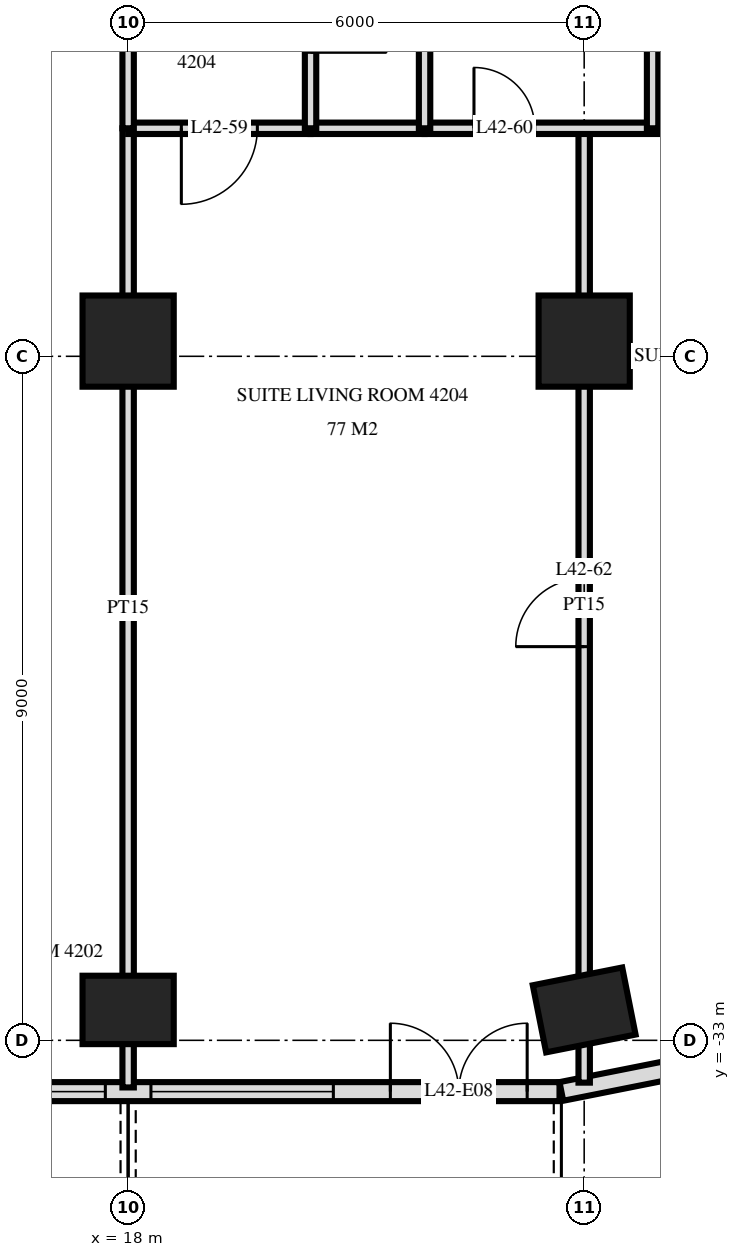
"""IFC4 building model, lengths in metres.
Left out: names, types, materials, properties, quantities, classifications, styles, units other than length and angle.
Written with IfcOpenShell. Run it as: python <this file> out.ifc"""

import sys

from ifc_helpers import new_model, si_unit, direction, frame, frame_2d, origin, origin_2d, place, context, subcontext, project, spatial, rectangle, extrude, element, fill, save


model = new_model("IFC4")
c1 = context("Model", 3, precision=1e-05, world=origin(), true_north=direction((0.0, 1.0)))
c2 = subcontext(c1, "Body", "Model", "MODEL_VIEW")
j1 = project(units=[si_unit("LENGTHUNIT", "METRE"), si_unit("PLANEANGLEUNIT", "RADIAN")], contexts=[c1])
p1 = place(None, origin())
s1 = spatial("IfcSite", under=j1, at=p1, CompositionType="ELEMENT")
p2 = place(p1, origin())
s2 = spatial("IfcBuilding", under=s1, at=p2, CompositionType="ELEMENT")
p3 = place(p2, frame((0.0, 0.0, 163.2)))
s3 = spatial("IfcBuildingStorey", under=s2, at=p3, CompositionType="ELEMENT", Elevation=163.2)
p4 = place(p3, frame((18.0, -32.6, 0.0), z_axis=(0.0, 0.0, 1.0), x_axis=(1.0, 0.0, 0.0)))
e1 = element("IfcColumn", 1, at=p4, inside=s3, PredefinedType="COLUMN", context=c2, shape_type="SweptSolid", body=[
    extrude(rectangle(XDim=1.2, YDim=0.9, at=origin_2d()), origin(), (0.0, 0.0, 1.0), 3.6),
])
p5 = place(p3, frame((18.0, -23.8, 0.0), z_axis=(0.0, 0.0, 1.0), x_axis=(1.0, 0.0, 0.0)))
e2 = element("IfcColumn", 2, at=p5, inside=s3, PredefinedType="COLUMN", context=c2, shape_type="SweptSolid", body=[
    extrude(rectangle(XDim=1.2, YDim=1.2, at=origin_2d()), origin(), (0.0, 0.0, 1.0), 3.6),
])
p6 = place(p3, frame((24.0, -32.6, 0.0), z_axis=(0.0, 0.0, 1.0), x_axis=(0.980792089743, 0.195056086032, 0.0)))
e3 = element("IfcColumn", 3, at=p6, inside=s3, PredefinedType="COLUMN", context=c2, shape_type="SweptSolid", body=[
    extrude(rectangle(XDim=1.2, YDim=0.9, at=origin_2d()), origin(), (0.0, 0.0, 1.0), 3.6),
])
p7 = place(p3, frame((24.0, -23.8, 0.0), z_axis=(0.0, 0.0, 1.0), x_axis=(1.0, 0.0, 0.0)))
e4 = element("IfcColumn", 4, at=p7, inside=s3, PredefinedType="COLUMN", context=c2, shape_type="SweptSolid", body=[
    extrude(rectangle(XDim=1.2, YDim=1.2, at=origin_2d()), origin(), (0.0, 0.0, 1.0), 3.6),
])
p8 = place(p3, frame((-23.675, -33.675, 0.0), z_axis=(0.0, 0.0, 1.0), x_axis=(1.0, 0.0, 0.0)))
e5 = element("IfcWall", 5, at=p8, inside=s3, PredefinedType="SOLIDWALL", context=c2, shape_type="SweptSolid", body=[
    extrude(rectangle(XDim=47.351, YDim=0.25, at=frame_2d((23.675, 0.0))), origin(), (0.0, 0.0, 1.0), 3.32),
])
p9 = place(p8, frame((0.575, 0.0, 0.0)))
e6 = element("IfcOpeningElement", 6, at=p9, cuts=e5, PredefinedType="OPENING", context=c2, shape_type="SweptSolid", body=[
    extrude(rectangle(XDim=1.8, YDim=2.4, at=frame_2d((0.9, 1.2))), frame((0.0, 0.135, 0.0), z_axis=(0.0, -1.0, 0.0), x_axis=(1.0, 0.0, 0.0)), (0.0, 0.0, 1.0), 0.27),
])
p10 = place(p8, frame((3.425, 0.0, 0.3)))
e7 = element("IfcOpeningElement", 7, at=p10, cuts=e5, PredefinedType="OPENING", context=c2, shape_type="SweptSolid", body=[
    extrude(rectangle(XDim=1.8, YDim=2.1, at=frame_2d((0.9, 1.05))), frame((0.0, 0.135, 0.0), z_axis=(0.0, -1.0, 0.0), x_axis=(1.0, 0.0, 0.0)), (0.0, 0.0, 1.0), 0.27),
])
p11 = place(p8, frame((5.975, 0.0, 0.3)))
e8 = element("IfcOpeningElement", 8, at=p11, cuts=e5, PredefinedType="OPENING", context=c2, shape_type="SweptSolid", body=[
    extrude(rectangle(XDim=2.4, YDim=2.1, at=frame_2d((1.2, 1.05))), frame((0.0, 0.135, 0.0), z_axis=(0.0, -1.0, 0.0), x_axis=(1.0, 0.0, 0.0)), (0.0, 0.0, 1.0), 0.27),
])
p12 = place(p8, frame((9.275, 0.0, 0.0)))
e9 = element("IfcOpeningElement", 9, at=p12, cuts=e5, PredefinedType="OPENING", context=c2, shape_type="SweptSolid", body=[
    extrude(rectangle(XDim=1.8, YDim=2.4, at=frame_2d((0.9, 1.2))), frame((0.0, 0.135, 0.0), z_axis=(0.0, -1.0, 0.0), x_axis=(1.0, 0.0, 0.0)), (0.0, 0.0, 1.0), 0.27),
])
p13 = place(p8, frame((12.275, 0.0, 0.0)))
e10 = element("IfcOpeningElement", 10, at=p13, cuts=e5, PredefinedType="OPENING", context=c2, shape_type="SweptSolid", body=[
    extrude(rectangle(XDim=1.8, YDim=2.4, at=frame_2d((0.9, 1.2))), frame((0.0, 0.135, 0.0), z_axis=(0.0, -1.0, 0.0), x_axis=(1.0, 0.0, 0.0)), (0.0, 0.0, 1.0), 0.27),
])
p14 = place(p8, frame((14.975, 0.0, 0.3)))
e11 = element("IfcOpeningElement", 11, at=p14, cuts=e5, PredefinedType="OPENING", context=c2, shape_type="SweptSolid", body=[
    extrude(rectangle(XDim=2.4, YDim=2.1, at=frame_2d((1.2, 1.05))), frame((0.0, 0.135, 0.0), z_axis=(0.0, -1.0, 0.0), x_axis=(1.0, 0.0, 0.0)), (0.0, 0.0, 1.0), 0.27),
])
p15 = place(p8, frame((17.975, 0.0, 0.3)))
e12 = element("IfcOpeningElement", 12, at=p15, cuts=e5, PredefinedType="OPENING", context=c2, shape_type="SweptSolid", body=[
    extrude(rectangle(XDim=2.4, YDim=2.1, at=frame_2d((1.2, 1.05))), frame((0.0, 0.135, 0.0), z_axis=(0.0, -1.0, 0.0), x_axis=(1.0, 0.0, 0.0)), (0.0, 0.0, 1.0), 0.27),
])
p16 = place(p8, frame((21.275, 0.0, 0.0)))
e13 = element("IfcOpeningElement", 13, at=p16, cuts=e5, PredefinedType="OPENING", context=c2, shape_type="SweptSolid", body=[
    extrude(rectangle(XDim=1.8, YDim=2.4, at=frame_2d((0.9, 1.2))), frame((0.0, 0.135, 0.0), z_axis=(0.0, -1.0, 0.0), x_axis=(1.0, 0.0, 0.0)), (0.0, 0.0, 1.0), 0.27),
])
p17 = place(p8, frame((24.275, 0.0, 0.0)))
e14 = element("IfcOpeningElement", 14, at=p17, cuts=e5, PredefinedType="OPENING", context=c2, shape_type="SweptSolid", body=[
    extrude(rectangle(XDim=1.8, YDim=2.4, at=frame_2d((0.9, 1.2))), frame((0.0, 0.135, 0.0), z_axis=(0.0, -1.0, 0.0), x_axis=(1.0, 0.0, 0.0)), (0.0, 0.0, 1.0), 0.27),
])
p18 = place(p8, frame((26.975, 0.0, 0.3)))
e15 = element("IfcOpeningElement", 15, at=p18, cuts=e5, PredefinedType="OPENING", context=c2, shape_type="SweptSolid", body=[
    extrude(rectangle(XDim=2.4, YDim=2.1, at=frame_2d((1.2, 1.05))), frame((0.0, 0.135, 0.0), z_axis=(0.0, -1.0, 0.0), x_axis=(1.0, 0.0, 0.0)), (0.0, 0.0, 1.0), 0.27),
])
p19 = place(p8, frame((30.275, 0.0, 0.0)))
e16 = element("IfcOpeningElement", 16, at=p19, cuts=e5, PredefinedType="OPENING", context=c2, shape_type="SweptSolid", body=[
    extrude(rectangle(XDim=1.8, YDim=2.4, at=frame_2d((0.9, 1.2))), frame((0.0, 0.135, 0.0), z_axis=(0.0, -1.0, 0.0), x_axis=(1.0, 0.0, 0.0)), (0.0, 0.0, 1.0), 0.27),
])
p20 = place(p8, frame((32.975, 0.0, 0.3)))
e17 = element("IfcOpeningElement", 17, at=p20, cuts=e5, PredefinedType="OPENING", context=c2, shape_type="SweptSolid", body=[
    extrude(rectangle(XDim=2.4, YDim=2.1, at=frame_2d((1.2, 1.05))), frame((0.0, 0.135, 0.0), z_axis=(0.0, -1.0, 0.0), x_axis=(1.0, 0.0, 0.0)), (0.0, 0.0, 1.0), 0.27),
])
p21 = place(p8, frame((36.275, 0.0, 0.0)))
e18 = element("IfcOpeningElement", 18, at=p21, cuts=e5, PredefinedType="OPENING", context=c2, shape_type="SweptSolid", body=[
    extrude(rectangle(XDim=1.8, YDim=2.4, at=frame_2d((0.9, 1.2))), frame((0.0, 0.135, 0.0), z_axis=(0.0, -1.0, 0.0), x_axis=(1.0, 0.0, 0.0)), (0.0, 0.0, 1.0), 0.27),
])
p22 = place(p8, frame((38.975, 0.0, 0.3)))
e19 = element("IfcOpeningElement", 19, at=p22, cuts=e5, PredefinedType="OPENING", context=c2, shape_type="SweptSolid", body=[
    extrude(rectangle(XDim=2.4, YDim=2.1, at=frame_2d((1.2, 1.05))), frame((0.0, 0.135, 0.0), z_axis=(0.0, -1.0, 0.0), x_axis=(1.0, 0.0, 0.0)), (0.0, 0.0, 1.0), 0.27),
])
p23 = place(p8, frame((41.975, 0.0, 0.3)))
e20 = element("IfcOpeningElement", 20, at=p23, cuts=e5, PredefinedType="OPENING", context=c2, shape_type="SweptSolid", body=[
    extrude(rectangle(XDim=2.4, YDim=2.1, at=frame_2d((1.2, 1.05))), frame((0.0, 0.135, 0.0), z_axis=(0.0, -1.0, 0.0), x_axis=(1.0, 0.0, 0.0)), (0.0, 0.0, 1.0), 0.27),
])
p24 = place(p8, frame((45.125, 0.0, 0.0)))
e21 = element("IfcOpeningElement", 21, at=p24, cuts=e5, PredefinedType="OPENING", context=c2, shape_type="SweptSolid", body=[
    extrude(rectangle(XDim=1.8, YDim=2.4, at=frame_2d((0.9, 1.2))), frame((0.0, 0.135, 0.0), z_axis=(0.0, -1.0, 0.0), x_axis=(1.0, 0.0, 0.0)), (0.0, 0.0, 1.0), 0.27),
])
p25 = place(p3, frame((23.7, -33.673, 0.0), z_axis=(0.0, 0.0, 1.0), x_axis=(0.980775640221, 0.19513878023, 0.0)))
e22 = element("IfcWall", 22, at=p25, inside=s3, PredefinedType="SOLIDWALL", context=c2, shape_type="SweptSolid", body=[
    extrude(rectangle(XDim=1.681, YDim=0.25, at=frame_2d((0.841, 0.0))), origin(), (0.0, 0.0, 1.0), 3.32),
])
p26 = place(p3, frame((24.9, -21.0, 0.0), z_axis=(0.0, 0.0, 1.0), x_axis=(0.0, 1.0, 0.0)))
e23 = element("IfcWall", 23, at=p26, inside=s3, PredefinedType="PARTITIONING", context=c2, shape_type="SweptSolid", body=[
    extrude(rectangle(XDim=3.0, YDim=0.15, at=frame_2d((1.5, 0.0))), origin(), (0.0, 0.0, 1.0), 3.32),
])
p27 = place(p3, frame((24.0, -33.557, 0.0), z_axis=(0.0, 0.0, 1.0), x_axis=(0.0, 1.0, 0.0)))
e24 = element("IfcWall", 24, at=p27, inside=s3, PredefinedType="PARTITIONING", context=c2, shape_type="SweptSolid", body=[
    extrude(rectangle(XDim=12.557, YDim=0.15, at=frame_2d((6.278, 0.0))), origin(), (0.0, 0.0, 1.0), 3.32),
])
p28 = place(p27, frame((5.737, 0.0, 0.0)))
e25 = element("IfcOpeningElement", 25, at=p28, cuts=e24, PredefinedType="OPENING", context=c2, shape_type="SweptSolid", body=[
    extrude(rectangle(XDim=0.9, YDim=2.1, at=frame_2d((0.45, 1.05))), frame((0.0, 0.085, 0.0), z_axis=(0.0, -1.0, 0.0), x_axis=(1.0, 0.0, 0.0)), (0.0, 0.0, 1.0), 0.17),
])
p29 = place(p3, frame((21.9, -21.0, 0.0), z_axis=(0.0, 0.0, 1.0), x_axis=(0.0, 1.0, 0.0)))
e26 = element("IfcWall", 26, at=p29, inside=s3, PredefinedType="PLUMBINGWALL", context=c2, shape_type="SweptSolid", body=[
    extrude(rectangle(XDim=3.0, YDim=0.15, at=frame_2d((1.5, 0.0))), origin(), (0.0, 0.0, 1.0), 3.32),
])
p30 = place(p3, frame((20.4, -21.0, 0.0), z_axis=(0.0, 0.0, 1.0), x_axis=(0.0, 1.0, 0.0)))
e27 = element("IfcWall", 27, at=p30, inside=s3, PredefinedType="PARTITIONING", context=c2, shape_type="SweptSolid", body=[
    extrude(rectangle(XDim=3.0, YDim=0.15, at=frame_2d((1.5, 0.0))), origin(), (0.0, 0.0, 1.0), 3.32),
])
p31 = place(p30, frame((1.0, 0.0, 0.0)))
e28 = element("IfcOpeningElement", 28, at=p31, cuts=e27, PredefinedType="OPENING", context=c2, shape_type="SweptSolid", body=[
    extrude(rectangle(XDim=1.0, YDim=2.1, at=frame_2d((0.5, 1.05))), frame((0.0, 0.085, 0.0), z_axis=(0.0, -1.0, 0.0), x_axis=(1.0, 0.0, 0.0)), (0.0, 0.0, 1.0), 0.17),
])
p32 = place(p3, frame((18.0, -21.0, 0.0), z_axis=(0.0, 0.0, 1.0), x_axis=(0.0, 1.0, 0.0)))
e29 = element("IfcWall", 29, at=p32, inside=s3, PredefinedType="PARTITIONING", context=c2, shape_type="SweptSolid", body=[
    extrude(rectangle(XDim=3.0, YDim=0.15, at=frame_2d((1.5, 0.0))), origin(), (0.0, 0.0, 1.0), 3.32),
])
p33 = place(p3, frame((18.0, -33.62, 0.0), z_axis=(0.0, 0.0, 1.0), x_axis=(0.0, 1.0, 0.0)))
e30 = element("IfcWall", 30, at=p33, inside=s3, PredefinedType="PARTITIONING", context=c2, shape_type="SweptSolid", body=[
    extrude(rectangle(XDim=12.62, YDim=0.15, at=frame_2d((6.31, 0.0))), origin(), (0.0, 0.0, 1.0), 3.32),
])
p34 = place(p3, frame((18.0, -21.0, 0.0), z_axis=(0.0, 0.0, 1.0), x_axis=(1.0, 0.0, 0.0)))
e31 = element("IfcWall", 31, at=p34, inside=s3, PredefinedType="PARTITIONING", context=c2, shape_type="SweptSolid", body=[
    extrude(rectangle(XDim=2.4, YDim=0.15, at=frame_2d((1.2, 0.0))), origin(), (0.0, 0.0, 1.0), 3.32),
])
p35 = place(p34, frame((0.7, 0.0, 0.0)))
e32 = element("IfcOpeningElement", 32, at=p35, cuts=e31, PredefinedType="OPENING", context=c2, shape_type="SweptSolid", body=[
    extrude(rectangle(XDim=1.0, YDim=2.1, at=frame_2d((0.5, 1.05))), frame((0.0, 0.085, 0.0), z_axis=(0.0, -1.0, 0.0), x_axis=(1.0, 0.0, 0.0)), (0.0, 0.0, 1.0), 0.17),
])
p36 = place(p3, frame((21.9, -21.0, 0.0), z_axis=(0.0, 0.0, 1.0), x_axis=(1.0, 0.0, 0.0)))
e33 = element("IfcWall", 33, at=p36, inside=s3, PredefinedType="PARTITIONING", context=c2, shape_type="SweptSolid", body=[
    extrude(rectangle(XDim=6.12, YDim=0.15, at=frame_2d((3.06, 0.0))), origin(), (0.0, 0.0, 1.0), 3.32),
])
p37 = place(p36, frame((0.65, 0.0, 0.0)))
e34 = element("IfcOpeningElement", 34, at=p37, cuts=e33, PredefinedType="OPENING", context=c2, shape_type="SweptSolid", body=[
    extrude(rectangle(XDim=0.8, YDim=2.1, at=frame_2d((0.4, 1.05))), frame((0.0, 0.085, 0.0), z_axis=(0.0, -1.0, 0.0), x_axis=(1.0, 0.0, 0.0)), (0.0, 0.0, 1.0), 0.17),
])
p38 = place(p36, frame((4.2, 0.0, 0.0)))
e35 = element("IfcOpeningElement", 35, at=p38, cuts=e33, PredefinedType="OPENING", context=c2, shape_type="SweptSolid", body=[
    extrude(rectangle(XDim=0.9, YDim=2.1, at=frame_2d((0.45, 1.05))), frame((0.0, 0.085, 0.0), z_axis=(0.0, -1.0, 0.0), x_axis=(1.0, 0.0, 0.0)), (0.0, 0.0, 1.0), 0.17),
])
p39 = place(p3, frame((20.4, -21.0, 0.0), z_axis=(0.0, 0.0, 1.0), x_axis=(1.0, 0.0, 0.0)))
e36 = element("IfcWall", 36, at=p39, inside=s3, PredefinedType="PLUMBINGWALL", context=c2, shape_type="SweptSolid", body=[
    extrude(rectangle(XDim=1.5, YDim=0.15, at=frame_2d((0.75, 0.0))), origin(), (0.0, 0.0, 1.0), 3.32),
])
p40 = place(p22, origin())
e37 = element("IfcWindow", 37, at=p40, inside=s3, PartitioningType="SINGLE_PANEL", PredefinedType="WINDOW", context=c2, shape_type="SweptSolid", body=[
    extrude(rectangle(XDim=2.4, YDim=2.1, at=frame_2d((1.2, 1.05))), frame((0.0, 0.03, 0.0), z_axis=(0.0, -1.0, 0.0), x_axis=(1.0, 0.0, 0.0)), (0.0, 0.0, 1.0), 0.06),
])
fill(e19, e37)
p41 = place(p23, origin())
e38 = element("IfcWindow", 38, at=p41, inside=s3, PartitioningType="SINGLE_PANEL", PredefinedType="WINDOW", context=c2, shape_type="SweptSolid", body=[
    extrude(rectangle(XDim=2.4, YDim=2.1, at=frame_2d((1.2, 1.05))), frame((0.0, 0.03, 0.0), z_axis=(0.0, -1.0, 0.0), x_axis=(1.0, 0.0, 0.0)), (0.0, 0.0, 1.0), 0.06),
])
fill(e20, e38)
p42 = place(p24, origin())
e39 = element("IfcDoor", 39, at=p42, inside=s3, OperationType="DOUBLE_DOOR_SINGLE_SWING", PredefinedType="DOOR", context=c2, shape_type="SweptSolid", body=[
    extrude(rectangle(XDim=1.8, YDim=2.4, at=frame_2d((0.9, 1.2))), frame((0.0, 0.025, 0.0), z_axis=(0.0, -1.0, 0.0), x_axis=(1.0, 0.0, 0.0)), (0.0, 0.0, 1.0), 0.05),
])
fill(e21, e39)
p43 = place(p35, frame((0.5, 0.0, 0.0), z_axis=(0.0, 0.0, 1.0), x_axis=(-1.0, 0.0, 0.0)))
e40 = element("IfcDoor", 40, at=p43, inside=s3, OperationType="SINGLE_SWING_LEFT", PredefinedType="DOOR", context=c2, shape_type="SweptSolid", body=[
    extrude(rectangle(XDim=1.0, YDim=2.1, at=frame_2d((0.0, 1.05))), frame((0.0, -0.025, 0.0), z_axis=(0.0, 1.0, 0.0), x_axis=(-1.0, 0.0, 0.0)), (0.0, 0.0, 1.0), 0.05),
])
fill(e32, e40)
p44 = place(p37, origin())
e41 = element("IfcDoor", 41, at=p44, inside=s3, OperationType="SINGLE_SWING_RIGHT", PredefinedType="DOOR", context=c2, shape_type="SweptSolid", body=[
    extrude(rectangle(XDim=0.8, YDim=2.1, at=frame_2d((0.4, 1.05))), frame((0.0, 0.025, 0.0), z_axis=(0.0, -1.0, 0.0), x_axis=(1.0, 0.0, 0.0)), (0.0, 0.0, 1.0), 0.05),
])
fill(e34, e41)
p45 = place(p28, origin())
e42 = element("IfcDoor", 42, at=p45, inside=s3, OperationType="SINGLE_SWING_RIGHT", PredefinedType="DOOR", context=c2, shape_type="SweptSolid", body=[
    extrude(rectangle(XDim=0.9, YDim=2.1, at=frame_2d((0.45, 1.05))), frame((0.0, 0.025, 0.0), z_axis=(0.0, -1.0, 0.0), x_axis=(1.0, 0.0, 0.0)), (0.0, 0.0, 1.0), 0.05),
])
fill(e25, e42)
save(model, sys.argv[1])
